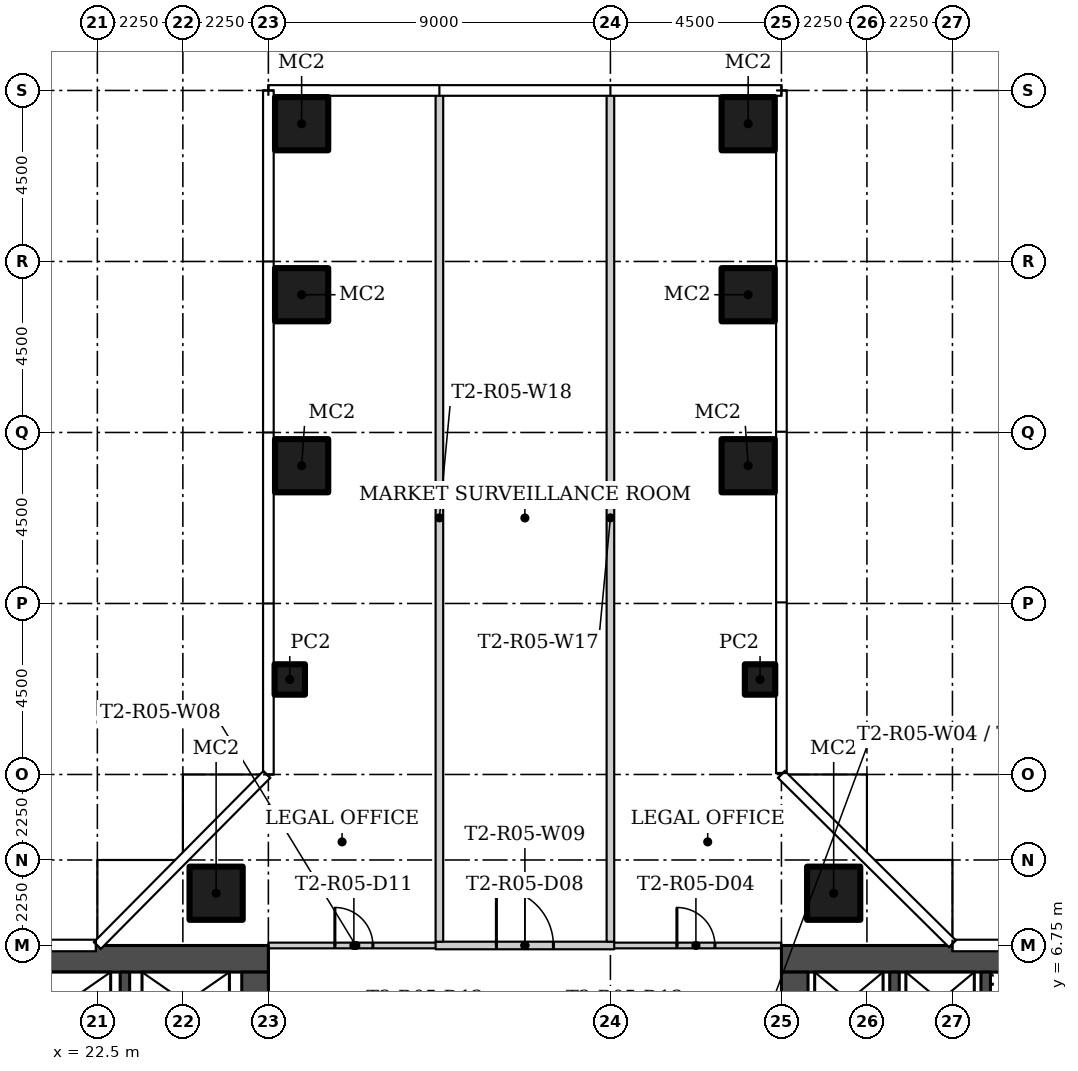
"""IFC4 building model, lengths in metres.
Left out: names, types, materials, properties, quantities, classifications, styles, units other than length and angle.
Written with IfcOpenShell. Run it as: python <this file> out.ifc"""

import sys

from ifc_helpers import new_model, si_unit, direction, frame, frame_2d, origin, origin_2d, place, context, subcontext, project, spatial, rectangle, hollow_rectangle, extrude, element, fill, save


model = new_model("IFC4")
c1 = context("Model", 3, precision=1e-05, world=origin(), true_north=direction((0.0, 1.0)))
c2 = subcontext(c1, "Body", "Model", "MODEL_VIEW")
j1 = project(units=[si_unit("LENGTHUNIT", "METRE"), si_unit("PLANEANGLEUNIT", "RADIAN")], contexts=[c1])
p1 = place(None, origin())
s1 = spatial("IfcSite", under=j1, at=p1, CompositionType="ELEMENT")
p2 = place(p1, origin())
s2 = spatial("IfcBuilding", under=s1, at=p2, CompositionType="ELEMENT")
p3 = place(p2, frame((0.0, 0.0, 57.6)))
s3 = spatial("IfcBuildingStorey", under=s2, at=p3, CompositionType="ELEMENT", Elevation=57.6)
for number, where in (
    (1, (25.625, 8.125, 0.0)),
    (2, (41.875, 8.125, 0.0)),
):
    element("IfcColumn", number, at=place(p3, frame(where)), inside=s3, PredefinedType="COLUMN", context=c2, shape_type="SweptSolid", body=[
        extrude(hollow_rectangle(XDim=1.4, YDim=1.4, WallThickness=0.05, at=origin_2d()), origin(), (0.0, 0.0, 1.0), 3.55),
    ])
p4 = place(p3, frame((39.938, 13.75, 0.0)))
e3 = element("IfcColumn", 3, at=p4, inside=s3, PredefinedType="COLUMN", context=c2, shape_type="SweptSolid", body=[
    extrude(hollow_rectangle(XDim=0.8, YDim=0.8, WallThickness=0.025, at=origin_2d()), origin(), (0.0, 0.0, 1.0), 3.55),
])
for number, where in (
    (4, (39.625, 19.375, 0.0)),
    (5, (39.625, 23.875, 0.0)),
    (6, (39.625, 28.375, 0.0)),
):
    element("IfcColumn", number, at=place(p3, frame(where)), inside=s3, PredefinedType="COLUMN", context=c2, shape_type="SweptSolid", body=[
        extrude(hollow_rectangle(XDim=1.4, YDim=1.4, WallThickness=0.05, at=origin_2d()), origin(), (0.0, 0.0, 1.0), 3.55),
    ])
p5 = place(p3, frame((27.562, 13.75, 0.0)))
e7 = element("IfcColumn", 7, at=p5, inside=s3, PredefinedType="COLUMN", context=c2, shape_type="SweptSolid", body=[
    extrude(hollow_rectangle(XDim=0.8, YDim=0.8, WallThickness=0.025, at=origin_2d()), origin(), (0.0, 0.0, 1.0), 3.55),
])
for number, where in (
    (8, (27.875, 19.375, 0.0)),
    (9, (27.875, 23.875, 0.0)),
    (10, (27.875, 28.375, 0.0)),
):
    element("IfcColumn", number, at=place(p3, frame(where)), inside=s3, PredefinedType="COLUMN", context=c2, shape_type="SweptSolid", body=[
        extrude(hollow_rectangle(XDim=1.4, YDim=1.4, WallThickness=0.05, at=origin_2d()), origin(), (0.0, 0.0, 1.0), 3.55),
    ])
p6 = place(p3, frame((35.9, 6.75, 0.0)))
e11 = element("IfcWall", 11, at=p6, inside=s3, PredefinedType="PARTITIONING", context=c2, shape_type="SweptSolid", body=[
    extrude(rectangle(XDim=4.6, YDim=0.15, at=frame_2d((2.3, 0.0))), origin(), (0.0, 0.0, 1.0), 3.55),
])
p7 = place(p6, frame((1.85, 0.0, 0.0)))
e12 = element("IfcOpeningElement", 12, at=p7, cuts=e11, PredefinedType="OPENING", context=c2, shape_type="SweptSolid", body=[
    extrude(rectangle(XDim=1.0, YDim=2.4, at=frame_2d((0.5, 1.2))), frame((0.0, 0.085, 0.0), z_axis=(0.0, -1.0, 0.0), x_axis=(1.0, 0.0, 0.0)), (0.0, 0.0, 1.0), 0.17),
])
p8 = place(p3, frame((27.0, 6.75, 0.0)))
e13 = element("IfcWall", 13, at=p8, inside=s3, PredefinedType="PARTITIONING", context=c2, shape_type="SweptSolid", body=[
    extrude(rectangle(XDim=4.6, YDim=0.15, at=frame_2d((2.3, 0.0))), origin(), (0.0, 0.0, 1.0), 3.55),
])
p9 = place(p8, frame((1.75, 0.0, 0.0)))
e14 = element("IfcOpeningElement", 14, at=p9, cuts=e13, PredefinedType="OPENING", context=c2, shape_type="SweptSolid", body=[
    extrude(rectangle(XDim=1.0, YDim=2.4, at=frame_2d((0.5, 1.2))), frame((0.0, 0.085, 0.0), z_axis=(0.0, -1.0, 0.0), x_axis=(1.0, 0.0, 0.0)), (0.0, 0.0, 1.0), 0.17),
])
p10 = place(p3, frame((31.4, 6.75, 0.0)))
e15 = element("IfcWall", 15, at=p10, inside=s3, PredefinedType="PARTITIONING", context=c2, shape_type="SweptSolid", body=[
    extrude(rectangle(XDim=4.7, YDim=0.2, at=frame_2d((2.35, 0.0))), origin(), (0.0, 0.0, 1.0), 3.55),
])
p11 = place(p10, frame((1.6, 0.0, 0.0)))
e16 = element("IfcOpeningElement", 16, at=p11, cuts=e15, PredefinedType="OPENING", context=c2, shape_type="SweptSolid", body=[
    extrude(rectangle(XDim=1.5, YDim=2.1, at=frame_2d((0.75, 1.05))), frame((0.0, 0.11, 0.0), z_axis=(0.0, -1.0, 0.0), x_axis=(1.0, 0.0, 0.0)), (0.0, 0.0, 1.0), 0.22),
])
for number, where, z_axis, x_axis in (
    (17, (36.0, 29.155, 0.0), (0.0, 0.0, 1.0), (0.0, -1.0, 0.0)),
    (18, (31.5, 29.155, 0.0), (0.0, 0.0, 1.0), (0.0, -1.0, 0.0)),
):
    element("IfcWall", number, at=place(p3, frame(where, z_axis=z_axis, x_axis=x_axis)), inside=s3, PredefinedType="PARTITIONING", context=c2, shape_type="SweptSolid", body=[
        extrude(rectangle(XDim=22.305, YDim=0.2, at=frame_2d((11.152, 0.0))), origin(), (0.0, 0.0, 1.0), 3.55),
    ])
p12 = place(p3, frame((13.5, 6.4, 0.0)))
e19 = element("IfcWall", 19, at=p12, inside=s3, PredefinedType="SHEAR", context=c2, shape_type="SweptSolid", body=[
    extrude(rectangle(XDim=13.5, YDim=0.7, at=frame_2d((6.75, 0.0))), origin(), (0.0, 0.0, 1.0), 3.55),
])
p13 = place(p3, frame((26.65, 6.05, 0.0), z_axis=(0.0, 0.0, 1.0), x_axis=(0.0, -1.0, 0.0)))
e20 = element("IfcWall", 20, at=p13, inside=s3, PredefinedType="SHEAR", context=c2, shape_type="SweptSolid", body=[
    extrude(rectangle(XDim=12.1, YDim=0.7, at=frame_2d((6.05, 0.0))), origin(), (0.0, 0.0, 1.0), 3.55),
])
p14 = place(p13, frame((10.1, 0.0, 0.0)))
e21 = element("IfcOpeningElement", 21, at=p14, cuts=e20, PredefinedType="OPENING", context=c2, shape_type="SweptSolid", body=[
    extrude(rectangle(XDim=1.2, YDim=2.1, at=frame_2d((0.6, 1.05))), frame((0.0, 0.36, 0.0), z_axis=(0.0, -1.0, 0.0), x_axis=(1.0, 0.0, 0.0)), (0.0, 0.0, 1.0), 0.72),
])
p15 = place(p13, frame((3.9, 0.0, 0.0)))
e22 = element("IfcOpeningElement", 22, at=p15, cuts=e20, PredefinedType="OPENING", context=c2, shape_type="SweptSolid", body=[
    extrude(rectangle(XDim=1.8, YDim=2.4, at=frame_2d((0.9, 1.2))), frame((0.0, 0.36, 0.0), z_axis=(0.0, -1.0, 0.0), x_axis=(1.0, 0.0, 0.0)), (0.0, 0.0, 1.0), 0.72),
])
p16 = place(p3, frame((23.225, 3.25, 0.0), z_axis=(0.0, 0.0, 1.0), x_axis=(0.0, 1.0, 0.0)))
e23 = element("IfcWall", 23, at=p16, inside=s3, PredefinedType="SHEAR", context=c2, shape_type="SweptSolid", body=[
    extrude(rectangle(XDim=2.8, YDim=0.25, at=frame_2d((1.4, 0.0))), origin(), (0.0, 0.0, 1.0), 3.55),
])
p17 = place(p3, frame((54.0, 6.4, 0.0), z_axis=(0.0, 0.0, 1.0), x_axis=(-1.0, 0.0, 0.0)))
e24 = element("IfcWall", 24, at=p17, inside=s3, PredefinedType="SHEAR", context=c2, shape_type="SweptSolid", body=[
    extrude(rectangle(XDim=13.5, YDim=0.7, at=frame_2d((6.75, 0.0))), origin(), (0.0, 0.0, 1.0), 3.55),
])
p18 = place(p3, frame((40.85, -6.05, 0.0), z_axis=(0.0, 0.0, 1.0), x_axis=(0.0, 1.0, 0.0)))
e25 = element("IfcWall", 25, at=p18, inside=s3, PredefinedType="SHEAR", context=c2, shape_type="SweptSolid", body=[
    extrude(rectangle(XDim=12.1, YDim=0.7, at=frame_2d((6.05, 0.0))), origin(), (0.0, 0.0, 1.0), 3.55),
])
p19 = place(p18, frame((0.8, 0.0, 0.0)))
e26 = element("IfcOpeningElement", 26, at=p19, cuts=e25, PredefinedType="OPENING", context=c2, shape_type="SweptSolid", body=[
    extrude(rectangle(XDim=1.2, YDim=2.1, at=frame_2d((0.6, 1.05))), frame((0.0, 0.36, 0.0), z_axis=(0.0, -1.0, 0.0), x_axis=(1.0, 0.0, 0.0)), (0.0, 0.0, 1.0), 0.72),
])
p20 = place(p18, frame((6.4, 0.0, 0.0)))
e27 = element("IfcOpeningElement", 27, at=p20, cuts=e25, PredefinedType="OPENING", context=c2, shape_type="SweptSolid", body=[
    extrude(rectangle(XDim=1.8, YDim=2.4, at=frame_2d((0.9, 1.2))), frame((0.0, 0.36, 0.0), z_axis=(0.0, -1.0, 0.0), x_axis=(1.0, 0.0, 0.0)), (0.0, 0.0, 1.0), 0.72),
])
for number, where, z_axis, x_axis in (
    (28, (45.875, 3.25, 0.0), (0.0, 0.0, 1.0), (0.0, 1.0, 0.0)),
    (29, (43.475, 3.25, 0.0), (0.0, 0.0, 1.0), (0.0, 1.0, 0.0)),
):
    element("IfcWall", number, at=place(p3, frame(where, z_axis=z_axis, x_axis=x_axis)), inside=s3, PredefinedType="SHEAR", context=c2, shape_type="SweptSolid", body=[
        extrude(rectangle(XDim=2.8, YDim=0.25, at=frame_2d((1.4, 0.0))), origin(), (0.0, 0.0, 1.0), 3.55),
    ])
p21 = place(p7, origin())
e30 = element("IfcDoor", 30, at=p21, inside=s3, OperationType="SINGLE_SWING_RIGHT", PredefinedType="DOOR", context=c2, shape_type="SweptSolid", body=[
    extrude(rectangle(XDim=1.0, YDim=2.4, at=frame_2d((0.5, 1.2))), frame((0.0, 0.025, 0.0), z_axis=(0.0, -1.0, 0.0), x_axis=(1.0, 0.0, 0.0)), (0.0, 0.0, 1.0), 0.05),
])
fill(e12, e30)
p22 = place(p11, origin())
e31 = element("IfcDoor", 31, at=p22, inside=s3, OperationType="DOUBLE_DOOR_SINGLE_SWING", PredefinedType="DOOR", context=c2, shape_type="SweptSolid", body=[
    extrude(rectangle(XDim=1.5, YDim=2.1, at=frame_2d((0.75, 1.05))), frame((0.0, 0.025, 0.0), z_axis=(0.0, -1.0, 0.0), x_axis=(1.0, 0.0, 0.0)), (0.0, 0.0, 1.0), 0.05),
])
fill(e16, e31)
p23 = place(p9, origin())
e32 = element("IfcDoor", 32, at=p23, inside=s3, OperationType="SINGLE_SWING_LEFT", PredefinedType="DOOR", context=c2, shape_type="SweptSolid", body=[
    extrude(rectangle(XDim=1.0, YDim=2.4, at=frame_2d((0.5, 1.2))), frame((0.0, 0.025, 0.0), z_axis=(0.0, -1.0, 0.0), x_axis=(1.0, 0.0, 0.0)), (0.0, 0.0, 1.0), 0.05),
])
fill(e14, e32)
save(model, sys.argv[1])
